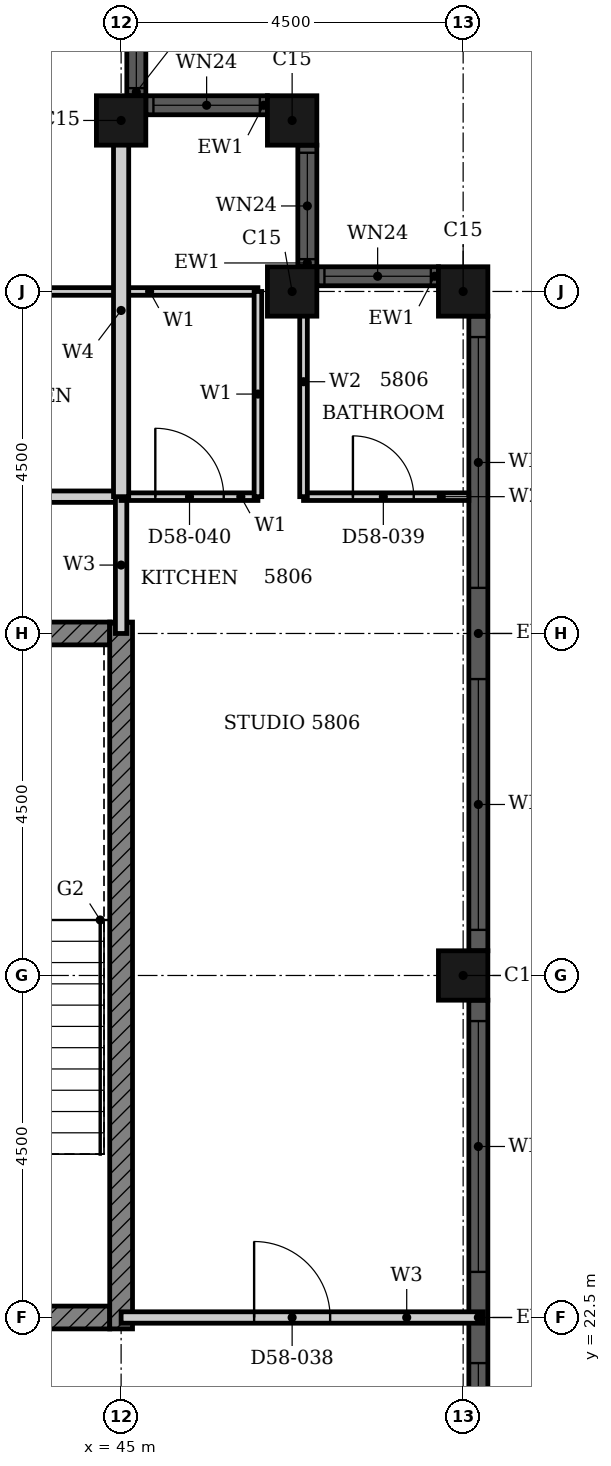
"""IFC4 building model, lengths in metres.
Left out: names, types, materials, properties, quantities, classifications, styles, units other than length and angle.
Written with IfcOpenShell. Run it as: python <this file> out.ifc"""

import sys

from ifc_helpers import new_model, si_unit, direction, frame, frame_2d, origin, origin_2d, place, context, subcontext, project, spatial, rectangle, hollow_rectangle, extrude, element, fill, save


model = new_model("IFC4")
c1 = context("Model", 3, precision=1e-05, world=origin(), true_north=direction((0.0, 1.0)))
c2 = subcontext(c1, "Body", "Model", "MODEL_VIEW")
j1 = project(units=[si_unit("LENGTHUNIT", "METRE"), si_unit("PLANEANGLEUNIT", "RADIAN")], contexts=[c1])
p1 = place(None, origin())
s1 = spatial("IfcSite", under=j1, at=p1, CompositionType="ELEMENT")
p2 = place(p1, origin())
s2 = spatial("IfcBuilding", under=s1, at=p2, CompositionType="ELEMENT")
p3 = place(p2, frame((0.0, 0.0, 229.4)))
s3 = spatial("IfcBuildingStorey", under=s2, at=p3, CompositionType="ELEMENT", Elevation=229.4)
for number, where, z_axis, x_axis in (
    (1, (49.5, 27.0, 0.0), (0.0, 0.0, 1.0), (1.0, 0.0, 0.0)),
    (2, (49.5, 36.0, 0.0), (0.0, 0.0, 1.0), (1.0, 0.0, 0.0)),
    (3, (47.25, 36.0, 0.0), (0.0, 0.0, 1.0), (1.0, 0.0, 0.0)),
    (4, (47.25, 38.25, 0.0), (0.0, 0.0, 1.0), (1.0, 0.0, 0.0)),
    (5, (45.0, 38.25, 0.0), (0.0, 0.0, 1.0), (1.0, 0.0, 0.0)),
):
    element("IfcColumn", number, at=place(p3, frame(where, z_axis=z_axis, x_axis=x_axis)), inside=s3, PredefinedType="COLUMN", context=c2, shape_type="SweptSolid", body=[
        extrude(hollow_rectangle(XDim=0.65, YDim=0.65, WallThickness=0.021, at=origin_2d()), origin(), (0.0, 0.0, 1.0), 3.7),
    ])
p4 = place(p3, frame((49.7, 18.325, 0.0), z_axis=(0.0, 0.0, 1.0), x_axis=(0.0, 1.0, 0.0)))
e6 = element("IfcWall", 6, at=p4, inside=s3, PredefinedType="SOLIDWALL", context=c2, shape_type="SweptSolid", body=[
    extrude(rectangle(XDim=8.35, YDim=0.25, at=frame_2d((4.175, 0.0))), origin(), (0.0, 0.0, 1.0), 3.7),
])
p5 = place(p4, frame((0.275, 0.0, 0.45)))
e7 = element("IfcOpeningElement", 7, at=p5, cuts=e6, PredefinedType="OPENING", context=c2, shape_type="SweptSolid", body=[
    extrude(rectangle(XDim=3.3, YDim=2.2, at=frame_2d((1.65, 1.1))), frame((0.0, 0.135, 0.0), z_axis=(0.0, -1.0, 0.0), x_axis=(1.0, 0.0, 0.0)), (0.0, 0.0, 1.0), 0.27),
])
p6 = place(p4, frame((4.775, 0.0, 0.45)))
e8 = element("IfcOpeningElement", 8, at=p6, cuts=e6, PredefinedType="OPENING", context=c2, shape_type="SweptSolid", body=[
    extrude(rectangle(XDim=3.3, YDim=2.2, at=frame_2d((1.65, 1.1))), frame((0.0, 0.135, 0.0), z_axis=(0.0, -1.0, 0.0), x_axis=(1.0, 0.0, 0.0)), (0.0, 0.0, 1.0), 0.27),
])
p7 = place(p3, frame((49.7, 27.325, 0.0), z_axis=(0.0, 0.0, 1.0), x_axis=(0.0, 1.0, 0.0)))
e9 = element("IfcWall", 9, at=p7, inside=s3, PredefinedType="SOLIDWALL", context=c2, shape_type="SweptSolid", body=[
    extrude(rectangle(XDim=8.35, YDim=0.25, at=frame_2d((4.175, 0.0))), origin(), (0.0, 0.0, 1.0), 3.7),
])
p8 = place(p7, frame((0.275, 0.0, 0.45)))
e10 = element("IfcOpeningElement", 10, at=p8, cuts=e9, PredefinedType="OPENING", context=c2, shape_type="SweptSolid", body=[
    extrude(rectangle(XDim=3.3, YDim=2.2, at=frame_2d((1.65, 1.1))), frame((0.0, 0.135, 0.0), z_axis=(0.0, -1.0, 0.0), x_axis=(1.0, 0.0, 0.0)), (0.0, 0.0, 1.0), 0.27),
])
p9 = place(p7, frame((4.775, 0.0, 0.45)))
e11 = element("IfcOpeningElement", 11, at=p9, cuts=e9, PredefinedType="OPENING", context=c2, shape_type="SweptSolid", body=[
    extrude(rectangle(XDim=3.3, YDim=2.2, at=frame_2d((1.65, 1.1))), frame((0.0, 0.135, 0.0), z_axis=(0.0, -1.0, 0.0), x_axis=(1.0, 0.0, 0.0)), (0.0, 0.0, 1.0), 0.27),
])
p10 = place(p3, frame((49.175, 36.2, 0.0), z_axis=(0.0, 0.0, 1.0), x_axis=(-1.0, 0.0, 0.0)))
e12 = element("IfcWall", 12, at=p10, inside=s3, PredefinedType="SOLIDWALL", context=c2, shape_type="SweptSolid", body=[
    extrude(rectangle(XDim=1.6, YDim=0.25, at=frame_2d((0.8, 0.0))), origin(), (0.0, 0.0, 1.0), 3.7),
])
p11 = place(p10, frame((0.1, 0.0, 0.9)))
e13 = element("IfcOpeningElement", 13, at=p11, cuts=e12, PredefinedType="OPENING", context=c2, shape_type="SweptSolid", body=[
    extrude(rectangle(XDim=1.4, YDim=1.75, at=frame_2d((0.7, 0.875))), frame((0.0, 0.135, 0.0), z_axis=(0.0, -1.0, 0.0), x_axis=(1.0, 0.0, 0.0)), (0.0, 0.0, 1.0), 0.27),
])
p12 = place(p3, frame((47.45, 36.325, 0.0), z_axis=(0.0, 0.0, 1.0), x_axis=(0.0, 1.0, 0.0)))
e14 = element("IfcWall", 14, at=p12, inside=s3, PredefinedType="SOLIDWALL", context=c2, shape_type="SweptSolid", body=[
    extrude(rectangle(XDim=1.6, YDim=0.25, at=frame_2d((0.8, 0.0))), origin(), (0.0, 0.0, 1.0), 3.7),
])
p13 = place(p12, frame((0.1, 0.0, 0.9)))
e15 = element("IfcOpeningElement", 15, at=p13, cuts=e14, PredefinedType="OPENING", context=c2, shape_type="SweptSolid", body=[
    extrude(rectangle(XDim=1.4, YDim=1.75, at=frame_2d((0.7, 0.875))), frame((0.0, 0.135, 0.0), z_axis=(0.0, -1.0, 0.0), x_axis=(1.0, 0.0, 0.0)), (0.0, 0.0, 1.0), 0.27),
])
p14 = place(p3, frame((46.925, 38.45, 0.0), z_axis=(0.0, 0.0, 1.0), x_axis=(-1.0, 0.0, 0.0)))
e16 = element("IfcWall", 16, at=p14, inside=s3, PredefinedType="SOLIDWALL", context=c2, shape_type="SweptSolid", body=[
    extrude(rectangle(XDim=1.6, YDim=0.25, at=frame_2d((0.8, 0.0))), origin(), (0.0, 0.0, 1.0), 3.7),
])
p15 = place(p14, frame((0.1, 0.0, 0.9)))
e17 = element("IfcOpeningElement", 17, at=p15, cuts=e16, PredefinedType="OPENING", context=c2, shape_type="SweptSolid", body=[
    extrude(rectangle(XDim=1.4, YDim=1.75, at=frame_2d((0.7, 0.875))), frame((0.0, 0.135, 0.0), z_axis=(0.0, -1.0, 0.0), x_axis=(1.0, 0.0, 0.0)), (0.0, 0.0, 1.0), 0.27),
])
p16 = place(p3, frame((45.2, 38.575, 0.0), z_axis=(0.0, 0.0, 1.0), x_axis=(0.0, 1.0, 0.0)))
e18 = element("IfcWall", 18, at=p16, inside=s3, PredefinedType="SOLIDWALL", context=c2, shape_type="SweptSolid", body=[
    extrude(rectangle(XDim=1.6, YDim=0.25, at=frame_2d((0.8, 0.0))), origin(), (0.0, 0.0, 1.0), 3.7),
])
p17 = place(p16, frame((0.1, 0.0, 0.9)))
e19 = element("IfcOpeningElement", 19, at=p17, cuts=e18, PredefinedType="OPENING", context=c2, shape_type="SweptSolid", body=[
    extrude(rectangle(XDim=1.4, YDim=1.75, at=frame_2d((0.7, 0.875))), frame((0.0, 0.135, 0.0), z_axis=(0.0, -1.0, 0.0), x_axis=(1.0, 0.0, 0.0)), (0.0, 0.0, 1.0), 0.27),
])
p18 = place(p3, frame((32.911, 22.5, 0.0), z_axis=(0.0, 0.0, 1.0), x_axis=(1.0, 0.0, 0.0)))
e20 = element("IfcWall", 20, at=p18, inside=s3, PredefinedType="SHEAR", context=c2, shape_type="SweptSolid", body=[
    extrude(rectangle(XDim=11.939, YDim=0.3, at=frame_2d((5.97, 0.0))), origin(), (0.0, 0.0, 1.0), 3.3),
])
p19 = place(p18, frame((5.404, 0.0, 0.0)))
e21 = element("IfcOpeningElement", 21, at=p19, cuts=e20, PredefinedType="OPENING", context=c2, shape_type="SweptSolid", body=[
    extrude(rectangle(XDim=1.8, YDim=2.1, at=frame_2d((0.9, 1.05))), frame((0.0, 0.16, 0.0), z_axis=(0.0, -1.0, 0.0), x_axis=(1.0, 0.0, 0.0)), (0.0, 0.0, 1.0), 0.32),
])
p20 = place(p3, frame((40.625, 31.5, 0.0), z_axis=(0.0, 0.0, 1.0), x_axis=(1.0, 0.0, 0.0)))
e22 = element("IfcWall", 22, at=p20, inside=s3, PredefinedType="SHEAR", context=c2, shape_type="SweptSolid", body=[
    extrude(rectangle(XDim=4.225, YDim=0.3, at=frame_2d((2.113, 0.0))), origin(), (0.0, 0.0, 1.0), 3.3),
])
p21 = place(p3, frame((45.0, 22.35, 0.0), z_axis=(0.0, 0.0, 1.0), x_axis=(0.0, 1.0, 0.0)))
e23 = element("IfcWall", 23, at=p21, inside=s3, PredefinedType="SHEAR", context=c2, shape_type="SweptSolid", body=[
    extrude(rectangle(XDim=9.3, YDim=0.3, at=frame_2d((4.65, 0.0))), origin(), (0.0, 0.0, 1.0), 3.3),
])
p22 = place(p3, frame((45.0, 22.5, 0.0), z_axis=(0.0, 0.0, 1.0), x_axis=(1.0, 0.0, 0.0)))
e24 = element("IfcWall", 24, at=p22, inside=s3, PredefinedType="PARTITIONING", context=c2, shape_type="SweptSolid", body=[
    extrude(rectangle(XDim=4.765, YDim=0.15, at=frame_2d((2.382, 0.0))), origin(), (0.0, 0.0, 1.0), 3.3),
])
p23 = place(p22, frame((1.75, 0.0, 0.0)))
e25 = element("IfcOpeningElement", 25, at=p23, cuts=e24, PredefinedType="OPENING", context=c2, shape_type="SweptSolid", body=[
    extrude(rectangle(XDim=1.0, YDim=2.2, at=frame_2d((0.5, 1.1))), frame((0.0, 0.085, 0.0), z_axis=(0.0, -1.0, 0.0), x_axis=(1.0, 0.0, 0.0)), (0.0, 0.0, 1.0), 0.17),
])
p24 = place(p3, frame((38.4, 33.3, 0.0), z_axis=(0.0, 0.0, 1.0), x_axis=(1.0, 0.0, 0.0)))
e26 = element("IfcWall", 26, at=p24, inside=s3, PredefinedType="PARTITIONING", context=c2, shape_type="SweptSolid", body=[
    extrude(rectangle(XDim=6.6, YDim=0.15, at=frame_2d((3.3, 0.0))), origin(), (0.0, 0.0, 1.0), 3.3),
])
p25 = place(p24, frame((1.3, 0.0, 0.0)))
e27 = element("IfcOpeningElement", 27, at=p25, cuts=e26, PredefinedType="OPENING", context=c2, shape_type="SweptSolid", body=[
    extrude(rectangle(XDim=1.0, YDim=2.2, at=frame_2d((0.5, 1.1))), frame((0.0, 0.085, 0.0), z_axis=(0.0, -1.0, 0.0), x_axis=(1.0, 0.0, 0.0)), (0.0, 0.0, 1.0), 0.17),
])
p26 = place(p3, frame((45.0, 31.5, 0.0), z_axis=(0.0, 0.0, 1.0), x_axis=(0.0, 1.0, 0.0)))
e28 = element("IfcWall", 28, at=p26, inside=s3, PredefinedType="PARTITIONING", context=c2, shape_type="SweptSolid", body=[
    extrude(rectangle(XDim=1.8, YDim=0.15, at=frame_2d((0.9, 0.0))), origin(), (0.0, 0.0, 1.0), 3.3),
])
p27 = place(p3, frame((45.0, 33.3, 0.0), z_axis=(0.0, 0.0, 1.0), x_axis=(1.0, 0.0, 0.0)))
e29 = element("IfcWall", 29, at=p27, inside=s3, PredefinedType="PARTITIONING", context=c2, shape_type="SweptSolid", body=[
    extrude(rectangle(XDim=1.8, YDim=0.1, at=frame_2d((0.9, 0.0))), origin(), (0.0, 0.0, 1.0), 3.3),
])
p28 = place(p27, frame((0.45, 0.0, 0.0)))
e30 = element("IfcOpeningElement", 30, at=p28, cuts=e29, PredefinedType="OPENING", context=c2, shape_type="SweptSolid", body=[
    extrude(rectangle(XDim=0.9, YDim=2.1, at=frame_2d((0.45, 1.05))), frame((0.0, 0.06, 0.0), z_axis=(0.0, -1.0, 0.0), x_axis=(1.0, 0.0, 0.0)), (0.0, 0.0, 1.0), 0.12),
])
p29 = place(p3, frame((42.0, 36.0, 0.0), z_axis=(0.0, 0.0, 1.0), x_axis=(1.0, 0.0, 0.0)))
e31 = element("IfcWall", 31, at=p29, inside=s3, PredefinedType="PARTITIONING", context=c2, shape_type="SweptSolid", body=[
    extrude(rectangle(XDim=4.8, YDim=0.1, at=frame_2d((2.4, 0.0))), origin(), (0.0, 0.0, 1.0), 3.3),
])
p30 = place(p29, frame((1.05, 0.0, 0.0)))
e32 = element("IfcOpeningElement", 32, at=p30, cuts=e31, PredefinedType="OPENING", context=c2, shape_type="SweptSolid", body=[
    extrude(rectangle(XDim=0.9, YDim=2.1, at=frame_2d((0.45, 1.05))), frame((0.0, 0.06, 0.0), z_axis=(0.0, -1.0, 0.0), x_axis=(1.0, 0.0, 0.0)), (0.0, 0.0, 1.0), 0.12),
])
p31 = place(p3, frame((46.8, 33.3, 0.0), z_axis=(0.0, 0.0, 1.0), x_axis=(0.0, 1.0, 0.0)))
e33 = element("IfcWall", 33, at=p31, inside=s3, PredefinedType="PARTITIONING", context=c2, shape_type="SweptSolid", body=[
    extrude(rectangle(XDim=2.7, YDim=0.1, at=frame_2d((1.35, 0.0))), origin(), (0.0, 0.0, 1.0), 3.3),
])
p32 = place(p3, frame((45.0, 33.3, 0.0), z_axis=(0.0, 0.0, 1.0), x_axis=(0.0, 1.0, 0.0)))
e34 = element("IfcWall", 34, at=p32, inside=s3, PredefinedType="PARTITIONING", context=c2, shape_type="SweptSolid", body=[
    extrude(rectangle(XDim=4.9, YDim=0.2, at=frame_2d((2.45, 0.0))), origin(), (0.0, 0.0, 1.0), 3.3),
])
p33 = place(p3, frame((47.4, 33.3, 0.0), z_axis=(0.0, 0.0, 1.0), x_axis=(1.0, 0.0, 0.0)))
e35 = element("IfcWall", 35, at=p33, inside=s3, PredefinedType="PARTITIONING", context=c2, shape_type="SweptSolid", body=[
    extrude(rectangle(XDim=2.175, YDim=0.1, at=frame_2d((1.087, 0.0))), origin(), (0.0, 0.0, 1.0), 3.3),
])
p34 = place(p33, frame((0.65, 0.0, 0.0)))
e36 = element("IfcOpeningElement", 36, at=p34, cuts=e35, PredefinedType="OPENING", context=c2, shape_type="SweptSolid", body=[
    extrude(rectangle(XDim=0.8, YDim=2.1, at=frame_2d((0.4, 1.05))), frame((0.0, 0.06, 0.0), z_axis=(0.0, -1.0, 0.0), x_axis=(1.0, 0.0, 0.0)), (0.0, 0.0, 1.0), 0.12),
])
p35 = place(p3, frame((47.4, 33.3, 0.0), z_axis=(0.0, 0.0, 1.0), x_axis=(0.0, 1.0, 0.0)))
e37 = element("IfcWall", 37, at=p35, inside=s3, PredefinedType="PARTITIONING", context=c2, shape_type="SweptSolid", body=[
    extrude(rectangle(XDim=3.025, YDim=0.1, at=frame_2d((1.512, 0.0))), origin(), (0.0, 0.0, 1.0), 3.3),
])
p36 = place(p5, origin())
e38 = element("IfcWindow", 38, at=p36, inside=s3, PartitioningType="SINGLE_PANEL", PredefinedType="WINDOW", context=c2, shape_type="SweptSolid", body=[
    extrude(rectangle(XDim=3.3, YDim=2.2, at=frame_2d((1.65, 1.1))), frame((0.0, 0.03, 0.0), z_axis=(0.0, -1.0, 0.0), x_axis=(1.0, 0.0, 0.0)), (0.0, 0.0, 1.0), 0.06),
])
fill(e7, e38)
p37 = place(p6, origin())
e39 = element("IfcWindow", 39, at=p37, inside=s3, PartitioningType="SINGLE_PANEL", PredefinedType="WINDOW", context=c2, shape_type="SweptSolid", body=[
    extrude(rectangle(XDim=3.3, YDim=2.2, at=frame_2d((1.65, 1.1))), frame((0.0, 0.03, 0.0), z_axis=(0.0, -1.0, 0.0), x_axis=(1.0, 0.0, 0.0)), (0.0, 0.0, 1.0), 0.06),
])
fill(e8, e39)
p38 = place(p8, origin())
e40 = element("IfcWindow", 40, at=p38, inside=s3, PartitioningType="SINGLE_PANEL", PredefinedType="WINDOW", context=c2, shape_type="SweptSolid", body=[
    extrude(rectangle(XDim=3.3, YDim=2.2, at=frame_2d((1.65, 1.1))), frame((0.0, 0.03, 0.0), z_axis=(0.0, -1.0, 0.0), x_axis=(1.0, 0.0, 0.0)), (0.0, 0.0, 1.0), 0.06),
])
fill(e10, e40)
p39 = place(p9, origin())
e41 = element("IfcWindow", 41, at=p39, inside=s3, PartitioningType="SINGLE_PANEL", PredefinedType="WINDOW", context=c2, shape_type="SweptSolid", body=[
    extrude(rectangle(XDim=3.3, YDim=2.2, at=frame_2d((1.65, 1.1))), frame((0.0, 0.03, 0.0), z_axis=(0.0, -1.0, 0.0), x_axis=(1.0, 0.0, 0.0)), (0.0, 0.0, 1.0), 0.06),
])
fill(e11, e41)
p40 = place(p11, origin())
e42 = element("IfcWindow", 42, at=p40, inside=s3, PartitioningType="SINGLE_PANEL", PredefinedType="WINDOW", context=c2, shape_type="SweptSolid", body=[
    extrude(rectangle(XDim=1.4, YDim=1.75, at=frame_2d((0.7, 0.875))), frame((0.0, 0.03, 0.0), z_axis=(0.0, -1.0, 0.0), x_axis=(1.0, 0.0, 0.0)), (0.0, 0.0, 1.0), 0.06),
])
fill(e13, e42)
p41 = place(p13, origin())
e43 = element("IfcWindow", 43, at=p41, inside=s3, PartitioningType="SINGLE_PANEL", PredefinedType="WINDOW", context=c2, shape_type="SweptSolid", body=[
    extrude(rectangle(XDim=1.4, YDim=1.75, at=frame_2d((0.7, 0.875))), frame((0.0, 0.03, 0.0), z_axis=(0.0, -1.0, 0.0), x_axis=(1.0, 0.0, 0.0)), (0.0, 0.0, 1.0), 0.06),
])
fill(e15, e43)
p42 = place(p15, origin())
e44 = element("IfcWindow", 44, at=p42, inside=s3, PartitioningType="SINGLE_PANEL", PredefinedType="WINDOW", context=c2, shape_type="SweptSolid", body=[
    extrude(rectangle(XDim=1.4, YDim=1.75, at=frame_2d((0.7, 0.875))), frame((0.0, 0.03, 0.0), z_axis=(0.0, -1.0, 0.0), x_axis=(1.0, 0.0, 0.0)), (0.0, 0.0, 1.0), 0.06),
])
fill(e17, e44)
p43 = place(p17, origin())
e45 = element("IfcWindow", 45, at=p43, inside=s3, PartitioningType="SINGLE_PANEL", PredefinedType="WINDOW", context=c2, shape_type="SweptSolid", body=[
    extrude(rectangle(XDim=1.4, YDim=1.75, at=frame_2d((0.7, 0.875))), frame((0.0, 0.03, 0.0), z_axis=(0.0, -1.0, 0.0), x_axis=(1.0, 0.0, 0.0)), (0.0, 0.0, 1.0), 0.06),
])
fill(e19, e45)
p44 = place(p23, origin())
e46 = element("IfcDoor", 46, at=p44, inside=s3, OperationType="SINGLE_SWING_LEFT", PredefinedType="DOOR", context=c2, shape_type="SweptSolid", body=[
    extrude(rectangle(XDim=1.0, YDim=2.2, at=frame_2d((0.5, 1.1))), frame((0.0, 0.025, 0.0), z_axis=(0.0, -1.0, 0.0), x_axis=(1.0, 0.0, 0.0)), (0.0, 0.0, 1.0), 0.05),
])
fill(e25, e46)
p45 = place(p34, origin())
e47 = element("IfcDoor", 47, at=p45, inside=s3, OperationType="SINGLE_SWING_LEFT", PredefinedType="DOOR", context=c2, shape_type="SweptSolid", body=[
    extrude(rectangle(XDim=0.8, YDim=2.1, at=frame_2d((0.4, 1.05))), frame((0.0, 0.025, 0.0), z_axis=(0.0, -1.0, 0.0), x_axis=(1.0, 0.0, 0.0)), (0.0, 0.0, 1.0), 0.05),
])
fill(e36, e47)
p46 = place(p28, origin())
e48 = element("IfcDoor", 48, at=p46, inside=s3, OperationType="SINGLE_SWING_RIGHT", PredefinedType="DOOR", context=c2, shape_type="SweptSolid", body=[
    extrude(rectangle(XDim=0.9, YDim=2.1, at=frame_2d((0.45, 1.05))), frame((0.0, 0.025, 0.0), z_axis=(0.0, -1.0, 0.0), x_axis=(1.0, 0.0, 0.0)), (0.0, 0.0, 1.0), 0.05),
])
fill(e30, e48)
save(model, sys.argv[1])
